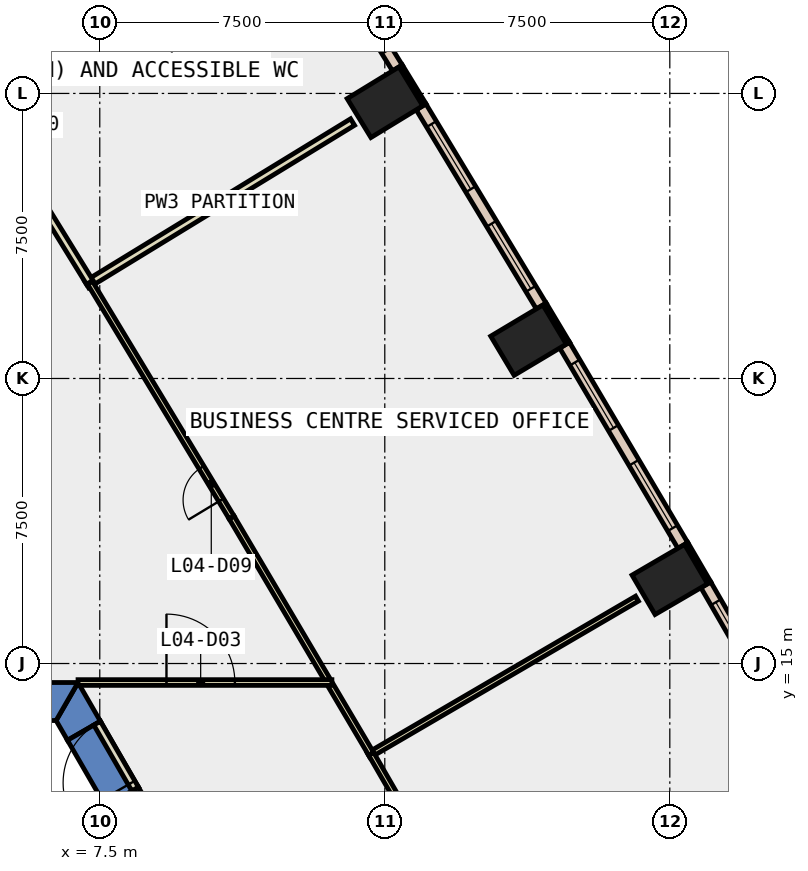
"""IFC4 building model, lengths in metres.
Left out: names, types, materials, properties, quantities, classifications, styles, units other than length and angle.
Written with IfcOpenShell. Run it as: python <this file> out.ifc"""

import sys

from ifc_helpers import new_model, si_unit, direction, frame, frame_2d, origin, origin_2d, place, context, subcontext, project, spatial, polyline, rectangle, outline, extrude, element, fill, save


model = new_model("IFC4")
c1 = context("Model", 3, precision=1e-05, world=origin(), true_north=direction((0.0, 1.0)))
c2 = subcontext(c1, "Body", "Model", "MODEL_VIEW")
j1 = project(units=[si_unit("LENGTHUNIT", "METRE"), si_unit("PLANEANGLEUNIT", "RADIAN")], contexts=[c1])
p1 = place(None, origin())
s1 = spatial("IfcSite", under=j1, at=p1, CompositionType="ELEMENT")
p2 = place(p1, origin())
s2 = spatial("IfcBuilding", under=s1, at=p2, CompositionType="ELEMENT")
p3 = place(p2, frame((0.0, 0.0, 25.0)))
s3 = spatial("IfcBuildingStorey", under=s2, at=p3, CompositionType="ELEMENT", Elevation=25.0)
for number, where, z_axis, x_axis in (
    (1, (22.5, 17.211, -0.45), (0.0, 0.0, 1.0), (-0.504, 0.864, 0.0)),
    (2, (18.782, 23.508, -0.45), (0.0, 0.0, 1.0), (-0.513, 0.858, 0.0)),
    (3, (15.005, 29.769, -0.45), (0.0, 0.0, 1.0), (-0.522, 0.853, 0.0)),
):
    element("IfcColumn", number, at=place(p3, frame(where, z_axis=z_axis, x_axis=x_axis)), inside=s3, PredefinedType="COLUMN", context=c2, shape_type="SweptSolid", body=[
        extrude(rectangle(XDim=1.2, YDim=1.6, at=origin_2d()), origin(), (0.0, 0.0, 1.0), 5.0),
    ])
p4 = place(p3, frame((0.0, 0.0, -0.45)))
e4 = element("IfcWall", 4, at=p4, inside=s3, PredefinedType="SHEAR", context=c2, shape_type="SweptSolid", body=[
    extrude(outline(polyline([(8.517, 11.748), (7.651, 11.248), (12.702, 2.5), (13.856, 2.5), (8.517, 11.748)])), origin(), (0.0, 0.0, 1.0), 5.0),
])
p5 = place(p3, frame((0.0, 0.0, -0.45)))
e5 = element("IfcWall", 5, at=p5, inside=s3, PredefinedType="SHEAR", context=c2, shape_type="SweptSolid", body=[
    extrude(outline(polyline([(6.651, 12.98), (7.517, 13.48), (6.928, 14.5), (6.351, 13.5), (6.651, 12.98)])), origin(), (0.0, 0.0, 1.0), 5.0),
])
p6 = place(p3, frame((0.0, 0.0, 3.6)))
e6 = element("IfcWall", 6, at=p6, inside=s3, PredefinedType="SHEAR", context=c2, shape_type="SweptSolid", body=[
    extrude(outline(polyline([(7.517, 13.48), (6.651, 12.98), (7.651, 11.248), (8.517, 11.748), (7.517, 13.48)])), origin(), (0.0, 0.0, 1.0), 0.95),
])
p7 = place(p3, frame((0.0, 0.0, -0.45)))
e7 = element("IfcWall", 7, at=p7, inside=s3, PredefinedType="SHEAR", context=c2, shape_type="SweptSolid", body=[
    extrude(outline(polyline([(4.55, 14.5), (4.55, 13.5), (6.351, 13.5), (6.928, 14.5), (4.55, 14.5)])), origin(), (0.0, 0.0, 1.0), 5.0),
])
p8 = place(p3, frame((23.536, 17.122, 0.0), z_axis=(0.0, 0.0, 1.0), x_axis=(-0.504313844903, 0.863520437418, 0.0)))
e8 = element("IfcWall", 8, at=p8, inside=s3, PredefinedType="STANDARD", context=c2, shape_type="SweptSolid", body=[
    extrude(rectangle(XDim=1.2, YDim=0.1, at=frame_2d((0.6, 0.0))), origin(), (0.0, 0.0, 1.0), 4.55),
])
p9 = place(p3, frame((19.82, 23.429, 0.0), z_axis=(0.0, 0.0, 1.0), x_axis=(-0.513238760752, 0.858245870635, 0.0)))
e9 = element("IfcWall", 9, at=p9, inside=s3, PredefinedType="STANDARD", context=c2, shape_type="SweptSolid", body=[
    extrude(rectangle(XDim=1.2, YDim=0.1, at=frame_2d((0.6, 0.0))), origin(), (0.0, 0.0, 1.0), 4.55),
])
p10 = place(p3, frame((16.043, 29.7, 0.0), z_axis=(0.0, 0.0, 1.0), x_axis=(-0.521507599072, 0.853246637327, 0.0)))
e10 = element("IfcWall", 10, at=p10, inside=s3, PredefinedType="STANDARD", context=c2, shape_type="SweptSolid", body=[
    extrude(rectangle(XDim=1.2, YDim=0.1, at=frame_2d((0.6, 0.0))), origin(), (0.0, 0.0, 1.0), 4.55),
])
p11 = place(p3, frame((26.507, 11.77, 0.0), z_axis=(0.0, 0.0, 1.0), x_axis=(-0.499939977436, 0.866060055055, 0.0)))
e11 = element("IfcWall", 11, at=p11, inside=s3, PredefinedType="STANDARD", context=c2, shape_type="SweptSolid", body=[
    extrude(rectangle(XDim=6.121, YDim=0.3, at=frame_2d((3.061, 0.0))), origin(), (0.0, 0.0, 1.0), 4.55),
])
p12 = place(p11, frame((0.53, 0.0, 1.0)))
e12 = element("IfcOpeningElement", 12, at=p12, cuts=e11, PredefinedType="OPENING", context=c2, shape_type="SweptSolid", body=[
    extrude(rectangle(XDim=2.0, YDim=3.2, at=frame_2d((1.0, 1.6))), frame((0.0, 0.16, 0.0), z_axis=(0.0, -1.0, 0.0), x_axis=(1.0, 0.0, 0.0)), (0.0, 0.0, 1.0), 0.32),
])
p13 = place(p11, frame((3.591, 0.0, 1.0)))
e13 = element("IfcOpeningElement", 13, at=p13, cuts=e11, PredefinedType="OPENING", context=c2, shape_type="SweptSolid", body=[
    extrude(rectangle(XDim=2.0, YDim=3.2, at=frame_2d((1.0, 1.6))), frame((0.0, 0.16, 0.0), z_axis=(0.0, -1.0, 0.0), x_axis=(1.0, 0.0, 0.0)), (0.0, 0.0, 1.0), 0.32),
])
p14 = place(p3, frame((22.843, 18.105, 0.0), z_axis=(0.0, 0.0, 1.0), x_axis=(-0.50834231483, 0.861155091115, 0.0)))
e14 = element("IfcWall", 14, at=p14, inside=s3, PredefinedType="STANDARD", context=c2, shape_type="SweptSolid", body=[
    extrude(rectangle(XDim=6.122, YDim=0.3, at=frame_2d((3.061, 0.0))), origin(), (0.0, 0.0, 1.0), 4.55),
])
p15 = place(p14, frame((0.53, 0.0, 1.0)))
e15 = element("IfcOpeningElement", 15, at=p15, cuts=e14, PredefinedType="OPENING", context=c2, shape_type="SweptSolid", body=[
    extrude(rectangle(XDim=2.0, YDim=3.2, at=frame_2d((1.0, 1.6))), frame((0.0, 0.16, 0.0), z_axis=(0.0, -1.0, 0.0), x_axis=(1.0, 0.0, 0.0)), (0.0, 0.0, 1.0), 0.32),
])
p16 = place(p14, frame((3.591, 0.0, 1.0)))
e16 = element("IfcOpeningElement", 16, at=p16, cuts=e14, PredefinedType="OPENING", context=c2, shape_type="SweptSolid", body=[
    extrude(rectangle(XDim=2.0, YDim=3.2, at=frame_2d((1.0, 1.6))), frame((0.0, 0.16, 0.0), z_axis=(0.0, -1.0, 0.0), x_axis=(1.0, 0.0, 0.0)), (0.0, 0.0, 1.0), 0.32),
])
p17 = place(p3, frame((19.117, 24.406, 0.0), z_axis=(0.0, 0.0, 1.0), x_axis=(-0.516687651362, 0.85617397235, 0.0)))
e17 = element("IfcWall", 17, at=p17, inside=s3, PredefinedType="STANDARD", context=c2, shape_type="SweptSolid", body=[
    extrude(rectangle(XDim=6.121, YDim=0.3, at=frame_2d((3.061, 0.0))), origin(), (0.0, 0.0, 1.0), 4.55),
])
p18 = place(p17, frame((0.53, 0.0, 1.0)))
e18 = element("IfcOpeningElement", 18, at=p18, cuts=e17, PredefinedType="OPENING", context=c2, shape_type="SweptSolid", body=[
    extrude(rectangle(XDim=2.0, YDim=3.2, at=frame_2d((1.0, 1.6))), frame((0.0, 0.16, 0.0), z_axis=(0.0, -1.0, 0.0), x_axis=(1.0, 0.0, 0.0)), (0.0, 0.0, 1.0), 0.32),
])
p19 = place(p17, frame((3.591, 0.0, 1.0)))
e19 = element("IfcOpeningElement", 19, at=p19, cuts=e17, PredefinedType="OPENING", context=c2, shape_type="SweptSolid", body=[
    extrude(rectangle(XDim=2.0, YDim=3.2, at=frame_2d((1.0, 1.6))), frame((0.0, 0.16, 0.0), z_axis=(0.0, -1.0, 0.0), x_axis=(1.0, 0.0, 0.0)), (0.0, 0.0, 1.0), 0.32),
])
p20 = place(p3, frame((15.331, 30.67, 0.0), z_axis=(0.0, 0.0, 1.0), x_axis=(-0.524953701886, 0.85113078365, 0.0)))
e20 = element("IfcWall", 20, at=p20, inside=s3, PredefinedType="STANDARD", context=c2, shape_type="SweptSolid", body=[
    extrude(rectangle(XDim=6.123, YDim=0.3, at=frame_2d((3.061, 0.0))), origin(), (0.0, 0.0, 1.0), 4.55),
])
p21 = place(p20, frame((0.531, 0.0, 1.0)))
e21 = element("IfcOpeningElement", 21, at=p21, cuts=e20, PredefinedType="OPENING", context=c2, shape_type="SweptSolid", body=[
    extrude(rectangle(XDim=2.0, YDim=3.2, at=frame_2d((1.0, 1.6))), frame((0.0, 0.16, 0.0), z_axis=(0.0, -1.0, 0.0), x_axis=(1.0, 0.0, 0.0)), (0.0, 0.0, 1.0), 0.32),
])
p22 = place(p20, frame((3.592, 0.0, 1.0)))
e22 = element("IfcOpeningElement", 22, at=p22, cuts=e20, PredefinedType="OPENING", context=c2, shape_type="SweptSolid", body=[
    extrude(rectangle(XDim=2.0, YDim=3.2, at=frame_2d((1.0, 1.6))), frame((0.0, 0.16, 0.0), z_axis=(0.0, -1.0, 0.0), x_axis=(1.0, 0.0, 0.0)), (0.0, 0.0, 1.0), 0.32),
])
p23 = place(p3, frame((14.577, 12.584, 0.0), z_axis=(0.0, 0.0, 1.0), x_axis=(0.863499311522, 0.504350016358, 0.0)))
e23 = element("IfcWall", 23, at=p23, inside=s3, PredefinedType="PARTITIONING", context=c2, shape_type="SweptSolid", body=[
    extrude(rectangle(XDim=8.175, YDim=0.15, at=frame_2d((4.087, 0.0))), origin(), (0.0, 0.0, 1.0), 4.55),
])
p24 = place(p3, frame((18.252, 6.368, 0.0), z_axis=(0.0, 0.0, 1.0), x_axis=(-0.499899030103, 0.866083690934, 0.0)))
e24 = element("IfcWall", 24, at=p24, inside=s3, PredefinedType="PARTITIONING", context=c2, shape_type="SweptSolid", body=[
    extrude(rectangle(XDim=7.221, YDim=0.15, at=frame_2d((3.611, 0.0))), origin(), (0.0, 0.0, 1.0), 4.55),
])
p25 = place(p24, frame((0.1, 0.0, 0.0)))
e25 = element("IfcOpeningElement", 25, at=p25, cuts=e24, PredefinedType="OPENING", context=c2, shape_type="SweptSolid", body=[
    extrude(rectangle(XDim=1.8, YDim=2.1, at=frame_2d((0.9, 1.05))), frame((0.0, 0.085, 0.0), z_axis=(0.0, -1.0, 0.0), x_axis=(1.0, 0.0, 0.0)), (0.0, 0.0, 1.0), 0.17),
])
p26 = place(p3, frame((7.156, 24.97, 0.0), z_axis=(0.0, 0.0, 1.0), x_axis=(0.853189087451, 0.52160174564, 0.0)))
e26 = element("IfcWall", 26, at=p26, inside=s3, PredefinedType="PARTITIONING", context=c2, shape_type="SweptSolid", body=[
    extrude(rectangle(XDim=8.2, YDim=0.2, at=frame_2d((4.1, 0.0))), origin(), (0.0, 0.0, 1.0), 4.55),
])
p27 = place(p3, frame((14.641, 12.623, 0.0), z_axis=(0.0, 0.0, 1.0), x_axis=(-0.508494775472, 0.861065074961, 0.0)))
e27 = element("IfcWall", 27, at=p27, inside=s3, PredefinedType="PARTITIONING", context=c2, shape_type="SweptSolid", body=[
    extrude(rectangle(XDim=2.104, YDim=0.15, at=frame_2d((1.052, 0.0))), origin(), (0.0, 0.0, 1.0), 4.55),
])
p28 = place(p3, frame((13.495, 14.565, 0.0), z_axis=(0.0, 0.0, 1.0), x_axis=(-0.508429753822, 0.861103469641, 0.0)))
e28 = element("IfcWall", 28, at=p28, inside=s3, PredefinedType="PARTITIONING", context=c2, shape_type="SweptSolid", body=[
    extrude(rectangle(XDim=4.97, YDim=0.15, at=frame_2d((2.485, 0.0))), origin(), (0.0, 0.0, 1.0), 4.55),
])
p29 = place(p3, frame((10.968, 18.845, 0.0), z_axis=(0.0, 0.0, 1.0), x_axis=(-0.516619201563, 0.856215277005, 0.0)))
e29 = element("IfcWall", 29, at=p29, inside=s3, PredefinedType="PARTITIONING", context=c2, shape_type="SweptSolid", body=[
    extrude(rectangle(XDim=7.214, YDim=0.15, at=frame_2d((3.607, 0.0))), origin(), (0.0, 0.0, 1.0), 4.55),
])
p30 = place(p29, frame((0.534, 0.0, 0.0)))
e30 = element("IfcOpeningElement", 30, at=p30, cuts=e29, PredefinedType="OPENING", context=c2, shape_type="SweptSolid", body=[
    extrude(rectangle(XDim=1.0, YDim=2.1, at=frame_2d((0.5, 1.05))), frame((0.0, 0.085, 0.0), z_axis=(0.0, -1.0, 0.0), x_axis=(1.0, 0.0, 0.0)), (0.0, 0.0, 1.0), 0.17),
])
p31 = place(p3, frame((7.236, 25.03, 0.0), z_axis=(0.0, 0.0, 1.0), x_axis=(-0.524904209579, 0.851161307137, 0.0)))
e31 = element("IfcWall", 31, at=p31, inside=s3, PredefinedType="PARTITIONING", context=c2, shape_type="SweptSolid", body=[
    extrude(rectangle(XDim=7.224, YDim=0.2, at=frame_2d((3.612, 0.0))), origin(), (0.0, 0.0, 1.0), 4.55),
])
p32 = place(p31, frame((3.07, 0.0, 0.0)))
e32 = element("IfcOpeningElement", 32, at=p32, cuts=e31, PredefinedType="OPENING", context=c2, shape_type="SweptSolid", body=[
    extrude(rectangle(XDim=1.0, YDim=2.1, at=frame_2d((0.5, 1.05))), frame((0.0, 0.11, 0.0), z_axis=(0.0, -1.0, 0.0), x_axis=(1.0, 0.0, 0.0)), (0.0, 0.0, 1.0), 0.22),
])
p33 = place(p3, frame((6.928, 14.5, 0.0), z_axis=(0.0, 0.0, 1.0), x_axis=(1.0, 0.0, 0.0)))
e33 = element("IfcWall", 33, at=p33, inside=s3, PredefinedType="PARTITIONING", context=c2, shape_type="SweptSolid", body=[
    extrude(rectangle(XDim=6.68, YDim=0.15, at=frame_2d((3.34, 0.0))), origin(), (0.0, 0.0, 1.0), 4.55),
])
p34 = place(p33, frame((2.327, 0.0, 0.0)))
e34 = element("IfcOpeningElement", 34, at=p34, cuts=e33, PredefinedType="OPENING", context=c2, shape_type="SweptSolid", body=[
    extrude(rectangle(XDim=1.8, YDim=2.1, at=frame_2d((0.9, 1.05))), frame((0.0, 0.085, 0.0), z_axis=(0.0, -1.0, 0.0), x_axis=(1.0, 0.0, 0.0)), (0.0, 0.0, 1.0), 0.17),
])
p35 = place(p3, frame((8.43, 11.698, 0.0), z_axis=(0.0, 0.0, 1.0), x_axis=(-0.50002537861, 0.866010750942, 0.0)))
e35 = element("IfcWall", 35, at=p35, inside=s3, PredefinedType="PARTITIONING", context=c2, shape_type="SweptSolid", body=[
    extrude(rectangle(XDim=2.0, YDim=0.2, at=frame_2d((1.0, 0.0))), origin(), (0.0, 0.0, 1.0), 2.4),
])
p36 = place(p35, frame((0.19, 0.0, 0.0)))
e36 = element("IfcOpeningElement", 36, at=p36, cuts=e35, PredefinedType="OPENING", context=c2, shape_type="SweptSolid", body=[
    extrude(rectangle(XDim=1.8, YDim=2.1, at=frame_2d((0.9, 1.05))), frame((0.0, 0.11, 0.0), z_axis=(0.0, -1.0, 0.0), x_axis=(1.0, 0.0, 0.0)), (0.0, 0.0, 1.0), 0.22),
])
p37 = place(p13, origin())
e37 = element("IfcWindow", 37, at=p37, inside=s3, PartitioningType="SINGLE_PANEL", PredefinedType="WINDOW", context=c2, shape_type="SweptSolid", body=[
    extrude(rectangle(XDim=2.0, YDim=3.2, at=frame_2d((1.0, 1.6))), frame((0.0, 0.03, 0.0), z_axis=(0.0, -1.0, 0.0), x_axis=(1.0, 0.0, 0.0)), (0.0, 0.0, 1.0), 0.06),
])
fill(e13, e37)
p38 = place(p15, origin())
e38 = element("IfcWindow", 38, at=p38, inside=s3, PartitioningType="SINGLE_PANEL", PredefinedType="WINDOW", context=c2, shape_type="SweptSolid", body=[
    extrude(rectangle(XDim=2.0, YDim=3.2, at=frame_2d((1.0, 1.6))), frame((0.0, 0.03, 0.0), z_axis=(0.0, -1.0, 0.0), x_axis=(1.0, 0.0, 0.0)), (0.0, 0.0, 1.0), 0.06),
])
fill(e15, e38)
p39 = place(p16, origin())
e39 = element("IfcWindow", 39, at=p39, inside=s3, PartitioningType="SINGLE_PANEL", PredefinedType="WINDOW", context=c2, shape_type="SweptSolid", body=[
    extrude(rectangle(XDim=2.0, YDim=3.2, at=frame_2d((1.0, 1.6))), frame((0.0, 0.03, 0.0), z_axis=(0.0, -1.0, 0.0), x_axis=(1.0, 0.0, 0.0)), (0.0, 0.0, 1.0), 0.06),
])
fill(e16, e39)
p40 = place(p18, origin())
e40 = element("IfcWindow", 40, at=p40, inside=s3, PartitioningType="SINGLE_PANEL", PredefinedType="WINDOW", context=c2, shape_type="SweptSolid", body=[
    extrude(rectangle(XDim=2.0, YDim=3.2, at=frame_2d((1.0, 1.6))), frame((0.0, 0.03, 0.0), z_axis=(0.0, -1.0, 0.0), x_axis=(1.0, 0.0, 0.0)), (0.0, 0.0, 1.0), 0.06),
])
fill(e18, e40)
p41 = place(p19, origin())
e41 = element("IfcWindow", 41, at=p41, inside=s3, PartitioningType="SINGLE_PANEL", PredefinedType="WINDOW", context=c2, shape_type="SweptSolid", body=[
    extrude(rectangle(XDim=2.0, YDim=3.2, at=frame_2d((1.0, 1.6))), frame((0.0, 0.03, 0.0), z_axis=(0.0, -1.0, 0.0), x_axis=(1.0, 0.0, 0.0)), (0.0, 0.0, 1.0), 0.06),
])
fill(e19, e41)
p42 = place(p34, origin())
e42 = element("IfcDoor", 42, at=p42, inside=s3, OperationType="DOUBLE_DOOR_SINGLE_SWING", PredefinedType="DOOR", context=c2, shape_type="SweptSolid", body=[
    extrude(rectangle(XDim=1.8, YDim=2.1, at=frame_2d((0.9, 1.05))), frame((0.0, 0.025, 0.0), z_axis=(0.0, -1.0, 0.0), x_axis=(1.0, 0.0, 0.0)), (0.0, 0.0, 1.0), 0.05),
])
fill(e34, e42)
p43 = place(p30, origin())
e43 = element("IfcDoor", 43, at=p43, inside=s3, OperationType="SINGLE_SWING_LEFT", PredefinedType="DOOR", context=c2, shape_type="SweptSolid", body=[
    extrude(rectangle(XDim=1.0, YDim=2.1, at=frame_2d((0.5, 1.05))), frame((0.0, 0.025, 0.0), z_axis=(0.0, -1.0, 0.0), x_axis=(1.0, 0.0, 0.0)), (0.0, 0.0, 1.0), 0.05),
])
fill(e30, e43)
p44 = place(p36, origin())
e44 = element("IfcDoor", 44, at=p44, inside=s3, OperationType="DOUBLE_DOOR_SINGLE_SWING", PredefinedType="DOOR", context=c2, shape_type="SweptSolid", body=[
    extrude(rectangle(XDim=1.8, YDim=2.1, at=frame_2d((0.9, 1.05))), frame((0.0, 0.025, 0.0), z_axis=(0.0, -1.0, 0.0), x_axis=(1.0, 0.0, 0.0)), (0.0, 0.0, 1.0), 0.05),
])
fill(e36, e44)
save(model, sys.argv[1])
